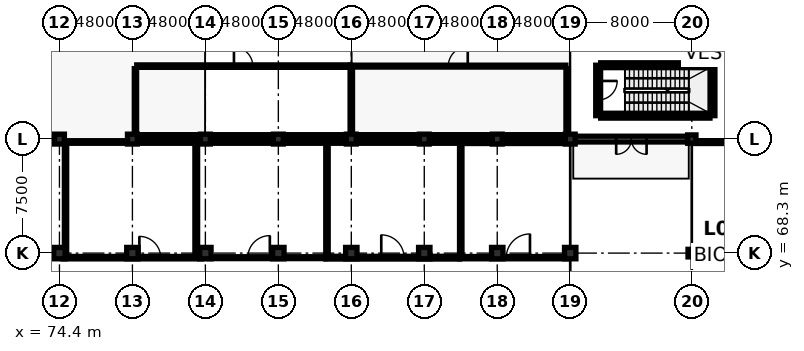
"""IFC4 building model, lengths in metres.
Left out: names, types, materials, properties, quantities, classifications, styles, units other than length and angle.
Written with IfcOpenShell. Run it as: python <this file> out.ifc"""

import sys

from ifc_helpers import new_model, si_unit, direction, frame, frame_2d, origin, origin_2d, place, context, subcontext, project, spatial, rectangle, circle, extrude, element, fill, save


model = new_model("IFC4")
c1 = context("Model", 3, precision=1e-05, world=origin(), true_north=direction((0.0, 1.0)))
c2 = subcontext(c1, "Body", "Model", "MODEL_VIEW")
j1 = project(units=[si_unit("LENGTHUNIT", "METRE"), si_unit("PLANEANGLEUNIT", "RADIAN")], contexts=[c1])
p1 = place(None, origin())
s1 = spatial("IfcSite", under=j1, at=p1, CompositionType="ELEMENT")
p2 = place(p1, origin())
s2 = spatial("IfcBuilding", under=s1, at=p2, CompositionType="ELEMENT")
p3 = place(p2, origin())
s3 = spatial("IfcBuildingStorey", under=s2, at=p3, CompositionType="ELEMENT", Elevation=0.0)
p4 = place(p3, frame((74.4, 68.3, 0.0), z_axis=(0.0, 0.0, 1.0), x_axis=(1.0, 0.0, 0.0)))
e1 = element("IfcColumn", 1, at=p4, inside=s3, PredefinedType="COLUMN", context=c2, shape_type="SweptSolid", body=[
    extrude(circle(Radius=0.375, at=origin_2d()), origin(), (0.0, 0.0, 1.0), 4.7),
])
p5 = place(p3, frame((74.4, 75.8, 0.0), z_axis=(0.0, 0.0, 1.0), x_axis=(1.0, 0.0, 0.0)))
e2 = element("IfcColumn", 2, at=p5, inside=s3, PredefinedType="COLUMN", context=c2, shape_type="SweptSolid", body=[
    extrude(circle(Radius=0.325, at=origin_2d()), origin(), (0.0, 0.0, 1.0), 4.7),
])
p6 = place(p3, frame((79.2, 68.3, 0.0), z_axis=(0.0, 0.0, 1.0), x_axis=(1.0, 0.0, 0.0)))
e3 = element("IfcColumn", 3, at=p6, inside=s3, PredefinedType="COLUMN", context=c2, shape_type="SweptSolid", body=[
    extrude(circle(Radius=0.375, at=origin_2d()), origin(), (0.0, 0.0, 1.0), 4.7),
])
p7 = place(p3, frame((79.2, 75.8, 0.0), z_axis=(0.0, 0.0, 1.0), x_axis=(1.0, 0.0, 0.0)))
e4 = element("IfcColumn", 4, at=p7, inside=s3, PredefinedType="COLUMN", context=c2, shape_type="SweptSolid", body=[
    extrude(circle(Radius=0.325, at=origin_2d()), origin(), (0.0, 0.0, 1.0), 4.7),
])
p8 = place(p3, frame((84.0, 68.3, 0.0), z_axis=(0.0, 0.0, 1.0), x_axis=(1.0, 0.0, 0.0)))
e5 = element("IfcColumn", 5, at=p8, inside=s3, PredefinedType="COLUMN", context=c2, shape_type="SweptSolid", body=[
    extrude(circle(Radius=0.375, at=origin_2d()), origin(), (0.0, 0.0, 1.0), 4.7),
])
p9 = place(p3, frame((84.0, 75.8, 0.0), z_axis=(0.0, 0.0, 1.0), x_axis=(1.0, 0.0, 0.0)))
e6 = element("IfcColumn", 6, at=p9, inside=s3, PredefinedType="COLUMN", context=c2, shape_type="SweptSolid", body=[
    extrude(circle(Radius=0.325, at=origin_2d()), origin(), (0.0, 0.0, 1.0), 4.7),
])
p10 = place(p3, frame((88.8, 68.3, 0.0), z_axis=(0.0, 0.0, 1.0), x_axis=(1.0, 0.0, 0.0)))
e7 = element("IfcColumn", 7, at=p10, inside=s3, PredefinedType="COLUMN", context=c2, shape_type="SweptSolid", body=[
    extrude(circle(Radius=0.375, at=origin_2d()), origin(), (0.0, 0.0, 1.0), 4.7),
])
p11 = place(p3, frame((88.8, 75.8, 0.0), z_axis=(0.0, 0.0, 1.0), x_axis=(1.0, 0.0, 0.0)))
e8 = element("IfcColumn", 8, at=p11, inside=s3, PredefinedType="COLUMN", context=c2, shape_type="SweptSolid", body=[
    extrude(circle(Radius=0.325, at=origin_2d()), origin(), (0.0, 0.0, 1.0), 4.7),
])
p12 = place(p3, frame((93.6, 68.3, 0.0), z_axis=(0.0, 0.0, 1.0), x_axis=(1.0, 0.0, 0.0)))
e9 = element("IfcColumn", 9, at=p12, inside=s3, PredefinedType="COLUMN", context=c2, shape_type="SweptSolid", body=[
    extrude(circle(Radius=0.375, at=origin_2d()), origin(), (0.0, 0.0, 1.0), 4.7),
])
p13 = place(p3, frame((93.6, 75.8, 0.0), z_axis=(0.0, 0.0, 1.0), x_axis=(1.0, 0.0, 0.0)))
e10 = element("IfcColumn", 10, at=p13, inside=s3, PredefinedType="COLUMN", context=c2, shape_type="SweptSolid", body=[
    extrude(circle(Radius=0.325, at=origin_2d()), origin(), (0.0, 0.0, 1.0), 4.7),
])
p14 = place(p3, frame((98.4, 68.3, 0.0), z_axis=(0.0, 0.0, 1.0), x_axis=(1.0, 0.0, 0.0)))
e11 = element("IfcColumn", 11, at=p14, inside=s3, PredefinedType="COLUMN", context=c2, shape_type="SweptSolid", body=[
    extrude(circle(Radius=0.375, at=origin_2d()), origin(), (0.0, 0.0, 1.0), 4.7),
])
p15 = place(p3, frame((98.4, 75.8, 0.0), z_axis=(0.0, 0.0, 1.0), x_axis=(1.0, 0.0, 0.0)))
e12 = element("IfcColumn", 12, at=p15, inside=s3, PredefinedType="COLUMN", context=c2, shape_type="SweptSolid", body=[
    extrude(circle(Radius=0.325, at=origin_2d()), origin(), (0.0, 0.0, 1.0), 4.7),
])
p16 = place(p3, frame((103.2, 68.3, 0.0), z_axis=(0.0, 0.0, 1.0), x_axis=(1.0, 0.0, 0.0)))
e13 = element("IfcColumn", 13, at=p16, inside=s3, PredefinedType="COLUMN", context=c2, shape_type="SweptSolid", body=[
    extrude(circle(Radius=0.375, at=origin_2d()), origin(), (0.0, 0.0, 1.0), 4.7),
])
p17 = place(p3, frame((103.2, 75.8, 0.0), z_axis=(0.0, 0.0, 1.0), x_axis=(1.0, 0.0, 0.0)))
e14 = element("IfcColumn", 14, at=p17, inside=s3, PredefinedType="COLUMN", context=c2, shape_type="SweptSolid", body=[
    extrude(circle(Radius=0.325, at=origin_2d()), origin(), (0.0, 0.0, 1.0), 4.7),
])
p18 = place(p3, frame((108.0, 68.3, 0.0), z_axis=(0.0, 0.0, 1.0), x_axis=(1.0, 0.0, 0.0)))
e15 = element("IfcColumn", 15, at=p18, inside=s3, PredefinedType="COLUMN", context=c2, shape_type="SweptSolid", body=[
    extrude(circle(Radius=0.375, at=origin_2d()), origin(), (0.0, 0.0, 1.0), 4.7),
])
p19 = place(p3, frame((108.0, 75.8, 0.0), z_axis=(0.0, 0.0, 1.0), x_axis=(1.0, 0.0, 0.0)))
e16 = element("IfcColumn", 16, at=p19, inside=s3, PredefinedType="COLUMN", context=c2, shape_type="SweptSolid", body=[
    extrude(circle(Radius=0.325, at=origin_2d()), origin(), (0.0, 0.0, 1.0), 4.7),
])
p20 = place(p3, frame((116.0, 68.3, 0.0), z_axis=(0.0, 0.0, 1.0), x_axis=(1.0, 0.0, 0.0)))
e17 = element("IfcColumn", 17, at=p20, inside=s3, PredefinedType="COLUMN", context=c2, shape_type="SweptSolid", body=[
    extrude(rectangle(XDim=0.5, YDim=0.5, at=origin_2d()), origin(), (0.0, 0.0, 1.0), 4.704),
])
p21 = place(p3, frame((116.0, 75.8, 0.0), z_axis=(0.0, 0.0, 1.0), x_axis=(1.0, 0.0, 0.0)))
e18 = element("IfcColumn", 18, at=p21, inside=s3, PredefinedType="COLUMN", context=c2, shape_type="SweptSolid", body=[
    extrude(rectangle(XDim=0.55, YDim=0.55, at=origin_2d()), origin(), (0.0, 0.0, 1.0), 4.7),
])
p22 = place(p3, frame((115.725, 75.8, 0.0), z_axis=(0.0, 0.0, 1.0), x_axis=(-1.0, 0.0, 0.0)))
e19 = element("IfcWall", 19, at=p22, inside=s3, PredefinedType="SOLIDWALL", context=c2, shape_type="SweptSolid", body=[
    extrude(rectangle(XDim=7.4, YDim=0.38, at=frame_2d((3.7, 0.0))), origin(), (0.0, 0.0, 1.0), 3.985),
])
p23 = place(p22, frame((2.7, 0.0, 0.0)))
e20 = element("IfcOpeningElement", 20, at=p23, cuts=e19, PredefinedType="OPENING", context=c2, shape_type="SweptSolid", body=[
    extrude(rectangle(XDim=2.0, YDim=2.35, at=frame_2d((1.0, 1.175))), frame((0.0, 0.202, 0.0), z_axis=(0.0, -1.0, 0.0), x_axis=(1.0, 0.0, 0.0)), (0.0, 0.0, 1.0), 0.404),
])
p24 = place(p3, frame((110.005, 77.34, 0.0), z_axis=(0.0, 0.0, 1.0), x_axis=(1.0, 0.0, 0.0)))
e21 = element("IfcWall", 21, at=p24, inside=s3, PredefinedType="SHEAR", context=c2, shape_type="SweptSolid", body=[
    extrude(rectangle(XDim=7.19, YDim=0.32, at=frame_2d((3.595, 0.0))), origin(), (0.0, 0.0, 1.0), 4.7),
])
p25 = place(p3, frame((117.36, 77.34, 0.0), z_axis=(0.0, 0.0, 1.0), x_axis=(0.0, 1.0, 0.0)))
e22 = element("IfcWall", 22, at=p25, inside=s3, PredefinedType="SHEAR", context=c2, shape_type="SweptSolid", body=[
    extrude(rectangle(XDim=3.32, YDim=0.32, at=frame_2d((1.66, 0.0))), origin(), (0.0, 0.0, 1.0), 4.7),
])
p26 = place(p3, frame((117.195, 80.66, 0.0), z_axis=(0.0, 0.0, 1.0), x_axis=(-1.0, 0.0, 0.0)))
e23 = element("IfcWall", 23, at=p26, inside=s3, PredefinedType="SHEAR", context=c2, shape_type="SweptSolid", body=[
    extrude(rectangle(XDim=7.19, YDim=0.32, at=frame_2d((3.595, 0.0))), origin(), (0.0, 0.0, 1.0), 4.7),
])
p27 = place(p3, frame((109.84, 80.66, 0.0), z_axis=(0.0, 0.0, 1.0), x_axis=(0.0, -1.0, 0.0)))
e24 = element("IfcWall", 24, at=p27, inside=s3, PredefinedType="SHEAR", context=c2, shape_type="SweptSolid", body=[
    extrude(rectangle(XDim=3.32, YDim=0.32, at=frame_2d((1.66, 0.0))), origin(), (0.0, 0.0, 1.0), 4.7),
])
p28 = place(p27, frame((1.035, 0.0, 0.0)))
e25 = element("IfcOpeningElement", 25, at=p28, cuts=e24, PredefinedType="OPENING", context=c2, shape_type="SweptSolid", body=[
    extrude(rectangle(XDim=1.25, YDim=2.2, at=frame_2d((0.625, 1.1))), frame((0.0, 0.172, 0.0), z_axis=(0.0, -1.0, 0.0), x_axis=(1.0, 0.0, 0.0)), (0.0, 0.0, 1.0), 0.344),
])
p29 = place(p3, frame((74.636, 68.0, 0.0), z_axis=(0.0, 0.0, 1.0), x_axis=(1.0, 0.0, 0.0)))
e26 = element("IfcWall", 26, at=p29, inside=s3, PredefinedType="PARTITIONING", context=c2, shape_type="SweptSolid", body=[
    extrude(rectangle(XDim=9.127, YDim=0.16, at=frame_2d((4.563, 0.0))), origin(), (0.0, 0.0, 1.0), 4.085),
])
p30 = place(p29, frame((5.022, 0.0, 0.0)))
e27 = element("IfcOpeningElement", 27, at=p30, cuts=e26, PredefinedType="OPENING", context=c2, shape_type="SweptSolid", body=[
    extrude(rectangle(XDim=1.4, YDim=2.25, at=frame_2d((0.7, 1.125))), frame((0.0, 0.092, 0.0), z_axis=(0.0, -1.0, 0.0), x_axis=(1.0, 0.0, 0.0)), (0.0, 0.0, 1.0), 0.184),
])
p31 = place(p3, frame((84.237, 68.0, 0.0), z_axis=(0.0, 0.0, 1.0), x_axis=(1.0, 0.0, 0.0)))
e28 = element("IfcWall", 28, at=p31, inside=s3, PredefinedType="PARTITIONING", context=c2, shape_type="SweptSolid", body=[
    extrude(rectangle(XDim=7.678, YDim=0.125, at=frame_2d((3.839, 0.0))), origin(), (0.0, 0.0, 1.0), 3.985),
])
p32 = place(p31, frame((2.554, 0.0, 0.0)))
e29 = element("IfcOpeningElement", 29, at=p32, cuts=e28, PredefinedType="OPENING", context=c2, shape_type="SweptSolid", body=[
    extrude(rectangle(XDim=1.45, YDim=2.26, at=frame_2d((0.725, 1.13))), frame((0.0, 0.074, 0.0), z_axis=(0.0, -1.0, 0.0), x_axis=(1.0, 0.0, 0.0)), (0.0, 0.0, 1.0), 0.149),
])
p33 = place(p3, frame((91.927, 68.0, 0.0), z_axis=(0.0, 0.0, 1.0), x_axis=(1.0, 0.0, 0.0)))
e30 = element("IfcWall", 30, at=p33, inside=s3, PredefinedType="PARTITIONING", context=c2, shape_type="SweptSolid", body=[
    extrude(rectangle(XDim=8.788, YDim=0.18, at=frame_2d((4.394, 0.0))), origin(), (0.0, 0.0, 1.0), 3.985),
])
p34 = place(p33, frame((3.644, 0.0, 0.0)))
e31 = element("IfcOpeningElement", 31, at=p34, cuts=e30, PredefinedType="OPENING", context=c2, shape_type="SweptSolid", body=[
    extrude(rectangle(XDim=1.5, YDim=2.28, at=frame_2d((0.75, 1.14))), frame((0.0, 0.102, 0.0), z_axis=(0.0, -1.0, 0.0), x_axis=(1.0, 0.0, 0.0)), (0.0, 0.0, 1.0), 0.204),
])
p35 = place(p3, frame((100.727, 68.0, 0.0), z_axis=(0.0, 0.0, 1.0), x_axis=(1.0, 0.0, 0.0)))
e32 = element("IfcWall", 32, at=p35, inside=s3, PredefinedType="PARTITIONING", context=c2, shape_type="SweptSolid", body=[
    extrude(rectangle(XDim=7.036, YDim=0.15, at=frame_2d((3.518, 0.0))), origin(), (0.0, 0.0, 1.0), 4.035),
])
p36 = place(p35, frame((3.067, 0.0, 0.0)))
e33 = element("IfcOpeningElement", 33, at=p36, cuts=e32, PredefinedType="OPENING", context=c2, shape_type="SweptSolid", body=[
    extrude(rectangle(XDim=1.56, YDim=2.3, at=frame_2d((0.78, 1.15))), frame((0.0, 0.087, 0.0), z_axis=(0.0, -1.0, 0.0), x_axis=(1.0, 0.0, 0.0)), (0.0, 0.0, 1.0), 0.174),
])
p37 = place(p3, frame((79.485, 80.6, 0.0), z_axis=(0.0, 0.0, 1.0), x_axis=(1.0, 0.0, 0.0)))
e34 = element("IfcWall", 34, at=p37, inside=s3, PredefinedType="PARTITIONING", context=c2, shape_type="SweptSolid", body=[
    extrude(rectangle(XDim=14.03, YDim=0.16, at=frame_2d((7.015, 0.0))), origin(), (0.0, 0.0, 1.0), 3.985),
])
p38 = place(p37, frame((6.395, 0.0, 0.0)))
e35 = element("IfcOpeningElement", 35, at=p38, cuts=e34, PredefinedType="OPENING", context=c2, shape_type="SweptSolid", body=[
    extrude(rectangle(XDim=1.24, YDim=2.2, at=frame_2d((0.62, 1.1))), frame((0.0, 0.092, 0.0), z_axis=(0.0, -1.0, 0.0), x_axis=(1.0, 0.0, 0.0)), (0.0, 0.0, 1.0), 0.184),
])
p39 = place(p3, frame((93.527, 80.6, 0.0), z_axis=(0.0, 0.0, 1.0), x_axis=(1.0, 0.0, 0.0)))
e36 = element("IfcWall", 36, at=p39, inside=s3, PredefinedType="PARTITIONING", context=c2, shape_type="SweptSolid", body=[
    extrude(rectangle(XDim=14.188, YDim=0.125, at=frame_2d((7.094, 0.0))), origin(), (0.0, 0.0, 1.0), 4.035),
])
p40 = place(p39, frame((6.454, 0.0, 0.0)))
e37 = element("IfcOpeningElement", 37, at=p40, cuts=e36, PredefinedType="OPENING", context=c2, shape_type="SweptSolid", body=[
    extrude(rectangle(XDim=1.28, YDim=2.22, at=frame_2d((0.64, 1.11))), frame((0.0, 0.074, 0.0), z_axis=(0.0, -1.0, 0.0), x_axis=(1.0, 0.0, 0.0)), (0.0, 0.0, 1.0), 0.149),
])
p41 = place(p3, frame((74.668, 75.6, 0.0), z_axis=(0.0, 0.0, 1.0), x_axis=(1.0, 0.0, 0.0)))
e38 = element("IfcWall", 38, at=p41, inside=s3, PredefinedType="PARTITIONING", context=c2, shape_type="SweptSolid", body=[
    extrude(rectangle(XDim=9.064, YDim=0.15, at=frame_2d((4.532, 0.0))), origin(), (0.0, 0.0, 1.0), 3.985),
])
p42 = place(p3, frame((84.224, 75.6, 0.0), z_axis=(0.0, 0.0, 1.0), x_axis=(1.0, 0.0, 0.0)))
e39 = element("IfcWall", 39, at=p42, inside=s3, PredefinedType="PARTITIONING", context=c2, shape_type="SweptSolid", body=[
    extrude(rectangle(XDim=7.691, YDim=0.15, at=frame_2d((3.845, 0.0))), origin(), (0.0, 0.0, 1.0), 3.985),
])
p43 = place(p3, frame((91.927, 75.6, 0.0), z_axis=(0.0, 0.0, 1.0), x_axis=(1.0, 0.0, 0.0)))
e40 = element("IfcWall", 40, at=p43, inside=s3, PredefinedType="PARTITIONING", context=c2, shape_type="SweptSolid", body=[
    extrude(rectangle(XDim=8.788, YDim=0.15, at=frame_2d((4.394, 0.0))), origin(), (0.0, 0.0, 1.0), 3.985),
])
p44 = place(p3, frame((100.727, 75.6, 0.0), z_axis=(0.0, 0.0, 1.0), x_axis=(1.0, 0.0, 0.0)))
e41 = element("IfcWall", 41, at=p44, inside=s3, PredefinedType="PARTITIONING", context=c2, shape_type="SweptSolid", body=[
    extrude(rectangle(XDim=7.005, YDim=0.18, at=frame_2d((3.502, 0.0))), origin(), (0.0, 0.0, 1.0), 3.985),
])
p45 = place(p3, frame((116.287, 75.6, 0.0), z_axis=(0.0, 0.0, 1.0), x_axis=(1.0, 0.0, 0.0)))
e42 = element("IfcWall", 42, at=p45, inside=s3, PredefinedType="PARTITIONING", context=c2, shape_type="SweptSolid", body=[
    extrude(rectangle(XDim=7.461, YDim=0.18, at=frame_2d((3.73, 0.0))), origin(), (0.0, 0.0, 1.0), 3.985),
])
p46 = place(p3, frame((79.468, 76.0, 0.0), z_axis=(0.0, 0.0, 1.0), x_axis=(1.0, 0.0, 0.0)))
e43 = element("IfcWall", 43, at=p46, inside=s3, PredefinedType="PARTITIONING", context=c2, shape_type="SweptSolid", body=[
    extrude(rectangle(XDim=13.88, YDim=0.18, at=frame_2d((6.94, 0.0))), origin(), (0.0, 0.0, 1.0), 3.985),
])
p47 = place(p3, frame((93.852, 76.0, 0.0), z_axis=(0.0, 0.0, 1.0), x_axis=(1.0, 0.0, 0.0)))
e44 = element("IfcWall", 44, at=p47, inside=s3, PredefinedType="PARTITIONING", context=c2, shape_type="SweptSolid", body=[
    extrude(rectangle(XDim=13.88, YDim=0.18, at=frame_2d((6.94, 0.0))), origin(), (0.0, 0.0, 1.0), 4.035),
])
p48 = place(p3, frame((74.8, 68.092, 0.0), z_axis=(0.0, 0.0, 1.0), x_axis=(0.0, 1.0, 0.0)))
e45 = element("IfcWall", 45, at=p48, inside=s3, PredefinedType="PARTITIONING", context=c2, shape_type="SweptSolid", body=[
    extrude(rectangle(XDim=7.421, YDim=0.15, at=frame_2d((3.71, 0.0))), origin(), (0.0, 0.0, 1.0), 3.985),
])
p49 = place(p3, frame((83.4, 68.092, 0.0), z_axis=(0.0, 0.0, 1.0), x_axis=(0.0, 1.0, 0.0)))
e46 = element("IfcWall", 46, at=p49, inside=s3, PredefinedType="PARTITIONING", context=c2, shape_type="SweptSolid", body=[
    extrude(rectangle(XDim=7.421, YDim=0.18, at=frame_2d((3.71, 0.0))), origin(), (0.0, 0.0, 1.0), 4.035),
])
p50 = place(p3, frame((92.0, 68.102, 0.0), z_axis=(0.0, 0.0, 1.0), x_axis=(0.0, 1.0, 0.0)))
e47 = element("IfcWall", 47, at=p50, inside=s3, PredefinedType="PARTITIONING", context=c2, shape_type="SweptSolid", body=[
    extrude(rectangle(XDim=7.411, YDim=0.16, at=frame_2d((3.706, 0.0))), origin(), (0.0, 0.0, 1.0), 4.085),
])
p51 = place(p3, frame((100.8, 68.087, 0.0), z_axis=(0.0, 0.0, 1.0), x_axis=(0.0, 1.0, 0.0)))
e48 = element("IfcWall", 48, at=p51, inside=s3, PredefinedType="PARTITIONING", context=c2, shape_type="SweptSolid", body=[
    extrude(rectangle(XDim=7.411, YDim=0.16, at=frame_2d((3.706, 0.0))), origin(), (0.0, 0.0, 1.0), 4.035),
])
p52 = place(p3, frame((79.4, 76.068, 0.0), z_axis=(0.0, 0.0, 1.0), x_axis=(0.0, 1.0, 0.0)))
e49 = element("IfcWall", 49, at=p52, inside=s3, PredefinedType="PARTITIONING", context=c2, shape_type="SweptSolid", body=[
    extrude(rectangle(XDim=4.367, YDim=0.15, at=frame_2d((2.184, 0.0))), origin(), (0.0, 0.0, 1.0), 4.035),
])
p53 = place(p3, frame((93.6, 76.137, 0.0), z_axis=(0.0, 0.0, 1.0), x_axis=(0.0, 1.0, 0.0)))
e50 = element("IfcWall", 50, at=p53, inside=s3, PredefinedType="PARTITIONING", context=c2, shape_type="SweptSolid", body=[
    extrude(rectangle(XDim=4.388, YDim=0.16, at=frame_2d((2.194, 0.0))), origin(), (0.0, 0.0, 1.0), 4.135),
])
p54 = place(p3, frame((107.8, 76.068, 0.0), z_axis=(0.0, 0.0, 1.0), x_axis=(0.0, 1.0, 0.0)))
e51 = element("IfcWall", 51, at=p54, inside=s3, PredefinedType="PARTITIONING", context=c2, shape_type="SweptSolid", body=[
    extrude(rectangle(XDim=4.367, YDim=0.16, at=frame_2d((2.184, 0.0))), origin(), (0.0, 0.0, 1.0), 4.035),
])
p55 = place(p23, origin())
e52 = element("IfcDoor", 52, at=p55, inside=s3, OperationType="DOUBLE_DOOR_SINGLE_SWING", PredefinedType="DOOR", context=c2, shape_type="SweptSolid", body=[
    extrude(rectangle(XDim=2.0, YDim=2.35, at=frame_2d((1.0, 1.175))), frame((0.0, 0.025, 0.0), z_axis=(0.0, -1.0, 0.0), x_axis=(1.0, 0.0, 0.0)), (0.0, 0.0, 1.0), 0.05),
])
fill(e20, e52)
p56 = place(p28, origin())
e53 = element("IfcDoor", 53, at=p56, inside=s3, OperationType="SINGLE_SWING_LEFT", PredefinedType="DOOR", context=c2, shape_type="SweptSolid", body=[
    extrude(rectangle(XDim=1.25, YDim=2.2, at=frame_2d((0.625, 1.1))), frame((0.0, 0.025, 0.0), z_axis=(0.0, -1.0, 0.0), x_axis=(1.0, 0.0, 0.0)), (0.0, 0.0, 1.0), 0.05),
])
fill(e25, e53)
p57 = place(p30, origin())
e54 = element("IfcDoor", 54, at=p57, inside=s3, OperationType="SINGLE_SWING_LEFT", PredefinedType="DOOR", context=c2, shape_type="SweptSolid", body=[
    extrude(rectangle(XDim=1.4, YDim=2.25, at=frame_2d((0.7, 1.125))), frame((0.0, 0.025, 0.0), z_axis=(0.0, -1.0, 0.0), x_axis=(1.0, 0.0, 0.0)), (0.0, 0.0, 1.0), 0.05),
])
fill(e27, e54)
p58 = place(p32, origin())
e55 = element("IfcDoor", 55, at=p58, inside=s3, OperationType="SINGLE_SWING_RIGHT", PredefinedType="DOOR", context=c2, shape_type="SweptSolid", body=[
    extrude(rectangle(XDim=1.45, YDim=2.26, at=frame_2d((0.725, 1.13))), frame((0.0, 0.025, 0.0), z_axis=(0.0, -1.0, 0.0), x_axis=(1.0, 0.0, 0.0)), (0.0, 0.0, 1.0), 0.05),
])
fill(e29, e55)
p59 = place(p34, origin())
e56 = element("IfcDoor", 56, at=p59, inside=s3, OperationType="SINGLE_SWING_LEFT", PredefinedType="DOOR", context=c2, shape_type="SweptSolid", body=[
    extrude(rectangle(XDim=1.5, YDim=2.28, at=frame_2d((0.75, 1.14))), frame((0.0, 0.025, 0.0), z_axis=(0.0, -1.0, 0.0), x_axis=(1.0, 0.0, 0.0)), (0.0, 0.0, 1.0), 0.05),
])
fill(e31, e56)
p60 = place(p36, origin())
e57 = element("IfcDoor", 57, at=p60, inside=s3, OperationType="SINGLE_SWING_RIGHT", PredefinedType="DOOR", context=c2, shape_type="SweptSolid", body=[
    extrude(rectangle(XDim=1.56, YDim=2.3, at=frame_2d((0.78, 1.15))), frame((0.0, 0.025, 0.0), z_axis=(0.0, -1.0, 0.0), x_axis=(1.0, 0.0, 0.0)), (0.0, 0.0, 1.0), 0.05),
])
fill(e33, e57)
p61 = place(p38, origin())
e58 = element("IfcDoor", 58, at=p61, inside=s3, OperationType="SINGLE_SWING_LEFT", PredefinedType="DOOR", context=c2, shape_type="SweptSolid", body=[
    extrude(rectangle(XDim=1.24, YDim=2.2, at=frame_2d((0.62, 1.1))), frame((0.0, 0.025, 0.0), z_axis=(0.0, -1.0, 0.0), x_axis=(1.0, 0.0, 0.0)), (0.0, 0.0, 1.0), 0.05),
])
fill(e35, e58)
p62 = place(p40, origin())
e59 = element("IfcDoor", 59, at=p62, inside=s3, OperationType="SINGLE_SWING_RIGHT", PredefinedType="DOOR", context=c2, shape_type="SweptSolid", body=[
    extrude(rectangle(XDim=1.28, YDim=2.22, at=frame_2d((0.64, 1.11))), frame((0.0, 0.025, 0.0), z_axis=(0.0, -1.0, 0.0), x_axis=(1.0, 0.0, 0.0)), (0.0, 0.0, 1.0), 0.05),
])
fill(e37, e59)
save(model, sys.argv[1])
